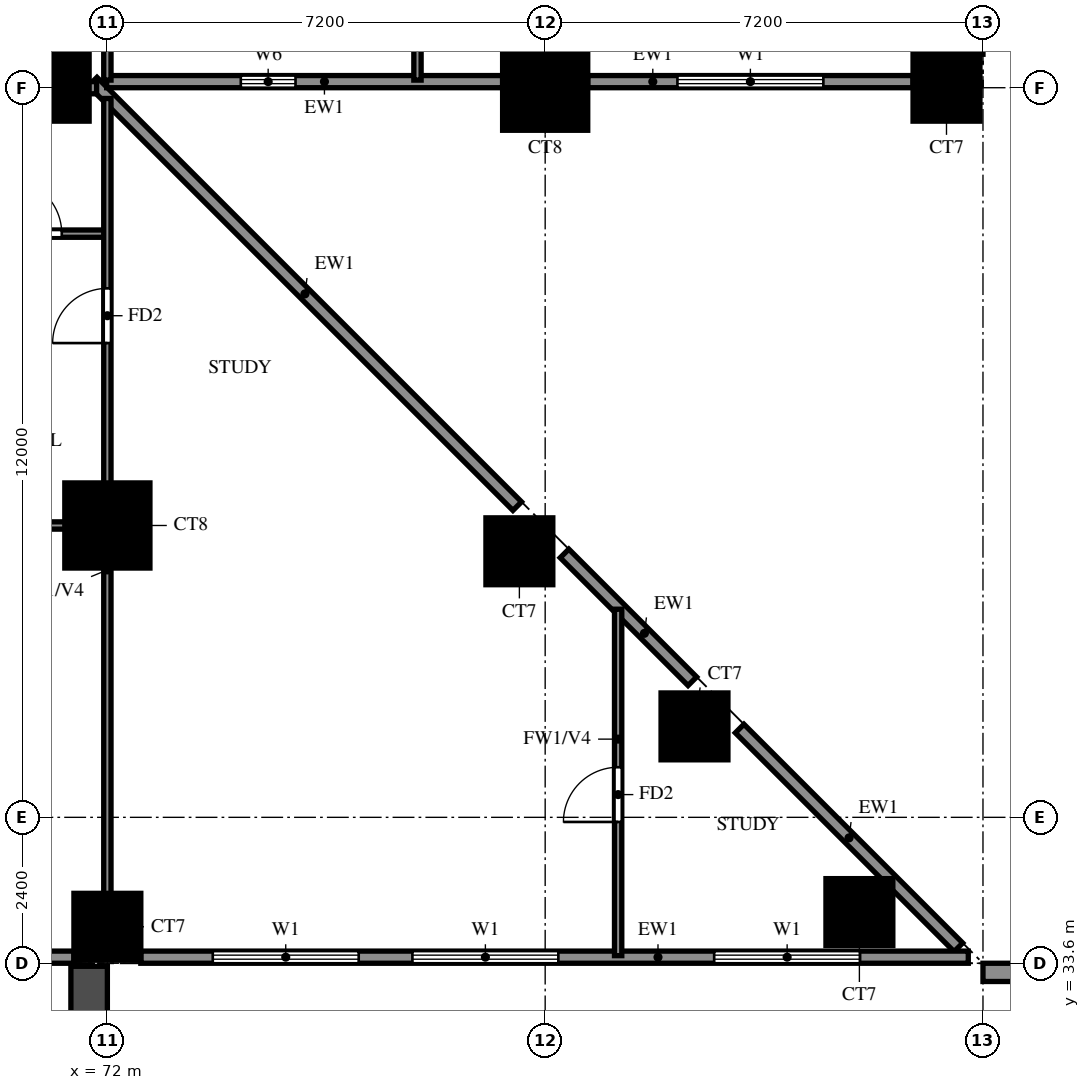
"""IFC4 building model, lengths in metres.
Left out: names, types, materials, properties, quantities, classifications, styles, units other than length and angle.
Written with IfcOpenShell. Run it as: python <this file> out.ifc"""

import sys

from ifc_helpers import new_model, si_unit, direction, frame, frame_2d, origin, origin_2d, place, context, subcontext, project, spatial, rectangle, extrude, source, transform, mapped, element, fill, save


model = new_model("IFC4")
c1 = context("Model", 3, precision=1e-05, world=origin(), true_north=direction((0.0, 1.0)))
c2 = subcontext(c1, "Body", "Model", "MODEL_VIEW")
j1 = project(units=[si_unit("LENGTHUNIT", "METRE"), si_unit("PLANEANGLEUNIT", "RADIAN")], contexts=[c1])
p1 = place(None, origin())
s1 = spatial("IfcSite", under=j1, at=p1, CompositionType="ELEMENT")
p2 = place(p1, origin())
s2 = spatial("IfcBuilding", under=s1, at=p2, CompositionType="ELEMENT")
p3 = place(p2, frame((0.0, 0.0, 44.5)))
s3 = spatial("IfcBuildingStorey", under=s2, at=p3, CompositionType="ELEMENT", Elevation=44.5)
m1 = source(origin(), c2, "Body", "SweptSolid", [
    extrude(rectangle(XDim=1.1, YDim=1.1, at=origin_2d()), origin(), (0.0, 0.0, 1.0), 3.18),
])
for number, where, z_axis, x_axis in (
    (1, (72.0, 34.2, 0.0), (0.0, 0.0, 1.0), (1.0, 0.0, 0.0)),
    (2, (84.367, 34.442, 0.0), (0.0, 0.0, 1.0), (1.0, 0.0, 0.0)),
    (3, (81.656, 37.496, 0.0), (0.0, 0.0, 1.0), (1.0, 0.0, 0.0)),
    (4, (78.776, 40.376, 0.0), (0.0, 0.0, 1.0), (1.0, 0.0, 0.0)),
):
    element("IfcColumn", number, at=place(p3, frame(where, z_axis=z_axis, x_axis=x_axis)), inside=s3, PredefinedType="COLUMN", context=c2, shape_type="MappedRepresentation", body=[
        mapped(m1, transform((0.0, 0.0, 0.0))),
    ])
m2 = source(origin(), c2, "Body", "SweptSolid", [
    extrude(rectangle(XDim=1.4, YDim=1.4, at=origin_2d()), origin(), (0.0, 0.0, 1.0), 3.18),
])
p4 = place(p3, frame((72.0, 40.8, 0.0), z_axis=(0.0, 0.0, 1.0), x_axis=(1.0, 0.0, 0.0)))
e5 = element("IfcColumn", 5, at=p4, inside=s3, PredefinedType="COLUMN", context=c2, shape_type="MappedRepresentation", body=[
    mapped(m2, transform((0.0, 0.0, 0.0))),
])
p5 = place(p3, frame((71.15, 48.0, 0.0), z_axis=(0.0, 0.0, 1.0), x_axis=(1.0, 0.0, 0.0)))
e6 = element("IfcColumn", 6, at=p5, inside=s3, PredefinedType="COLUMN", context=c2, shape_type="MappedRepresentation", body=[
    mapped(m1, transform((0.0, 0.0, 0.0))),
])
p6 = place(p3, frame((79.2, 48.0, 0.0), z_axis=(0.0, 0.0, 1.0), x_axis=(1.0, 0.0, 0.0)))
e7 = element("IfcColumn", 7, at=p6, inside=s3, PredefinedType="COLUMN", context=c2, shape_type="MappedRepresentation", body=[
    mapped(m2, transform((0.0, 0.0, 0.0))),
])
p7 = place(p3, frame((85.8, 48.0, 0.0), z_axis=(0.0, 0.0, 1.0), x_axis=(1.0, 0.0, 0.0)))
e8 = element("IfcColumn", 8, at=p7, inside=s3, PredefinedType="COLUMN", context=c2, shape_type="MappedRepresentation", body=[
    mapped(m1, transform((0.0, 0.0, 0.0))),
])
p8 = place(p3, frame((85.996, 33.863, 0.0), z_axis=(0.0, 0.0, 1.0), x_axis=(-0.7070827891, 0.707130772459, 0.0)))
e9 = element("IfcWall", 9, at=p8, inside=s3, PredefinedType="SOLIDWALL", context=c2, shape_type="SweptSolid", body=[
    extrude(rectangle(XDim=5.088, YDim=0.2, at=frame_2d((2.544, 0.0))), origin(), (0.0, 0.0, 1.0), 3.18),
])
p9 = place(p3, frame((81.62, 38.238, 0.0), z_axis=(0.0, 0.0, 1.0), x_axis=(-0.707106781187, 0.707106781187, 0.0)))
e10 = element("IfcWall", 10, at=p9, inside=s3, PredefinedType="SOLIDWALL", context=c2, shape_type="SweptSolid", body=[
    extrude(rectangle(XDim=2.973, YDim=0.2, at=frame_2d((1.486, 0.0))), origin(), (0.0, 0.0, 1.0), 3.18),
])
p10 = place(p3, frame((78.74, 41.118, 0.0), z_axis=(0.0, 0.0, 1.0), x_axis=(-0.707106781187, 0.707106781187, 0.0)))
e11 = element("IfcWall", 11, at=p10, inside=s3, PredefinedType="SOLIDWALL", context=c2, shape_type="SweptSolid", body=[
    extrude(rectangle(XDim=9.874, YDim=0.2, at=frame_2d((4.937, 0.0))), origin(), (0.0, 0.0, 1.0), 3.18),
])
p11 = place(p3, frame((71.989, 48.1, 0.0), z_axis=(0.0, 0.0, 1.0), x_axis=(1.0, 0.0, 0.0)))
e12 = element("IfcWall", 12, at=p11, inside=s3, PredefinedType="SOLIDWALL", context=c2, shape_type="SweptSolid", body=[
    extrude(rectangle(XDim=6.511, YDim=0.2, at=frame_2d((3.256, 0.0))), origin(), (0.0, 0.0, 1.0), 3.18),
])
p12 = place(p11, frame((2.206, 0.0, 1.5)))
e13 = element("IfcOpeningElement", 13, at=p12, cuts=e12, PredefinedType="OPENING", context=c2, shape_type="SweptSolid", body=[
    extrude(rectangle(XDim=0.9, YDim=0.9, at=frame_2d((0.45, 0.45))), frame((0.0, 0.11, 0.0), z_axis=(0.0, -1.0, 0.0), x_axis=(1.0, 0.0, 0.0)), (0.0, 0.0, 1.0), 0.22),
])
p13 = place(p3, frame((79.9, 48.1, 0.0), z_axis=(0.0, 0.0, 1.0), x_axis=(1.0, 0.0, 0.0)))
e14 = element("IfcWall", 14, at=p13, inside=s3, PredefinedType="SOLIDWALL", context=c2, shape_type="SweptSolid", body=[
    extrude(rectangle(XDim=5.35, YDim=0.2, at=frame_2d((2.675, 0.0))), origin(), (0.0, 0.0, 1.0), 3.18),
])
p14 = place(p13, frame((1.475, 0.0, 0.6)))
e15 = element("IfcOpeningElement", 15, at=p14, cuts=e14, PredefinedType="OPENING", context=c2, shape_type="SweptSolid", body=[
    extrude(rectangle(XDim=2.4, YDim=2.4, at=frame_2d((1.2, 1.2))), frame((0.0, 0.11, 0.0), z_axis=(0.0, -1.0, 0.0), x_axis=(1.0, 0.0, 0.0)), (0.0, 0.0, 1.0), 0.22),
])
p15 = place(p3, frame((86.3, 48.55, 0.0), z_axis=(0.0, 0.0, 1.0), x_axis=(0.0, 1.0, 0.0)))
e16 = element("IfcWall", 16, at=p15, inside=s3, PredefinedType="SOLIDWALL", context=c2, shape_type="SweptSolid", body=[
    extrude(rectangle(XDim=6.1, YDim=0.2, at=frame_2d((3.05, 0.0))), origin(), (0.0, 0.0, 1.0), 3.18),
])
p16 = place(p15, frame((3.95, 0.0, 0.0)))
e17 = element("IfcOpeningElement", 17, at=p16, cuts=e16, PredefinedType="OPENING", context=c2, shape_type="SweptSolid", body=[
    extrude(rectangle(XDim=1.8, YDim=2.4, at=frame_2d((0.9, 1.2))), frame((0.0, 0.11, 0.0), z_axis=(0.0, -1.0, 0.0), x_axis=(1.0, 0.0, 0.0)), (0.0, 0.0, 1.0), 0.22),
])
p17 = place(p15, frame((0.425, 0.0, 0.6)))
e18 = element("IfcOpeningElement", 18, at=p17, cuts=e16, PredefinedType="OPENING", context=c2, shape_type="SweptSolid", body=[
    extrude(rectangle(XDim=1.2, YDim=2.4, at=frame_2d((0.6, 1.2))), frame((0.0, 0.11, 0.0), z_axis=(0.0, -1.0, 0.0), x_axis=(1.0, 0.0, 0.0)), (0.0, 0.0, 1.0), 0.22),
])
p18 = place(p3, frame((65.35, 33.7, 0.0), z_axis=(0.0, 0.0, 1.0), x_axis=(1.0, 0.0, 0.0)))
e19 = element("IfcWall", 19, at=p18, inside=s3, PredefinedType="SOLIDWALL", context=c2, shape_type="SweptSolid", body=[
    extrude(rectangle(XDim=6.1, YDim=0.2, at=frame_2d((3.05, 0.0))), origin(), (0.0, 0.0, 1.0), 3.18),
])
p19 = place(p18, frame((2.15, 0.0, 0.0)))
e20 = element("IfcOpeningElement", 20, at=p19, cuts=e19, PredefinedType="OPENING", context=c2, shape_type="SweptSolid", body=[
    extrude(rectangle(XDim=1.8, YDim=2.4, at=frame_2d((0.9, 1.2))), frame((0.0, 0.11, 0.0), z_axis=(0.0, -1.0, 0.0), x_axis=(1.0, 0.0, 0.0)), (0.0, 0.0, 1.0), 0.22),
])
p20 = place(p18, frame((0.425, 0.0, 0.6)))
e21 = element("IfcOpeningElement", 21, at=p20, cuts=e19, PredefinedType="OPENING", context=c2, shape_type="SweptSolid", body=[
    extrude(rectangle(XDim=1.2, YDim=2.4, at=frame_2d((0.6, 1.2))), frame((0.0, 0.11, 0.0), z_axis=(0.0, -1.0, 0.0), x_axis=(1.0, 0.0, 0.0)), (0.0, 0.0, 1.0), 0.22),
])
p21 = place(p18, frame((4.475, 0.0, 0.6)))
e22 = element("IfcOpeningElement", 22, at=p21, cuts=e19, PredefinedType="OPENING", context=c2, shape_type="SweptSolid", body=[
    extrude(rectangle(XDim=1.2, YDim=2.4, at=frame_2d((0.6, 1.2))), frame((0.0, 0.11, 0.0), z_axis=(0.0, -1.0, 0.0), x_axis=(1.0, 0.0, 0.0)), (0.0, 0.0, 1.0), 0.22),
])
p22 = place(p3, frame((72.55, 33.7, 0.0), z_axis=(0.0, 0.0, 1.0), x_axis=(1.0, 0.0, 0.0)))
e23 = element("IfcWall", 23, at=p22, inside=s3, PredefinedType="SOLIDWALL", context=c2, shape_type="SweptSolid", body=[
    extrude(rectangle(XDim=13.609, YDim=0.2, at=frame_2d((6.804, 0.0))), origin(), (0.0, 0.0, 1.0), 3.18),
])
p23 = place(p22, frame((1.183, 0.0, 0.6)))
e24 = element("IfcOpeningElement", 24, at=p23, cuts=e23, PredefinedType="OPENING", context=c2, shape_type="SweptSolid", body=[
    extrude(rectangle(XDim=2.4, YDim=2.4, at=frame_2d((1.2, 1.2))), frame((0.0, 0.11, 0.0), z_axis=(0.0, -1.0, 0.0), x_axis=(1.0, 0.0, 0.0)), (0.0, 0.0, 1.0), 0.22),
])
p24 = place(p22, frame((4.467, 0.0, 0.6)))
e25 = element("IfcOpeningElement", 25, at=p24, cuts=e23, PredefinedType="OPENING", context=c2, shape_type="SweptSolid", body=[
    extrude(rectangle(XDim=2.4, YDim=2.4, at=frame_2d((1.2, 1.2))), frame((0.0, 0.11, 0.0), z_axis=(0.0, -1.0, 0.0), x_axis=(1.0, 0.0, 0.0)), (0.0, 0.0, 1.0), 0.22),
])
p25 = place(p22, frame((9.429, 0.0, 0.6)))
e26 = element("IfcOpeningElement", 26, at=p25, cuts=e23, PredefinedType="OPENING", context=c2, shape_type="SweptSolid", body=[
    extrude(rectangle(XDim=2.4, YDim=2.4, at=frame_2d((1.2, 1.2))), frame((0.0, 0.11, 0.0), z_axis=(0.0, -1.0, 0.0), x_axis=(1.0, 0.0, 0.0)), (0.0, 0.0, 1.0), 0.22),
])
p26 = place(p3, frame((86.4, 33.45, -0.32), z_axis=(0.0, 0.0, 1.0), x_axis=(1.0, 0.0, 0.0)))
e27 = element("IfcWall", 27, at=p26, inside=s3, PredefinedType="SOLIDWALL", context=c2, shape_type="SweptSolid", body=[
    extrude(rectangle(XDim=2.4, YDim=0.3, at=frame_2d((1.2, 0.0))), origin(), (0.0, 0.0, 1.0), 3.5),
])
p27 = place(p3, frame((71.7, 33.55, 0.0), z_axis=(0.0, 0.0, 1.0), x_axis=(0.0, -1.0, 0.0)))
e28 = element("IfcWall", 28, at=p27, inside=s3, PredefinedType="SOLIDWALL", context=c2, shape_type="SweptSolid", body=[
    extrude(rectangle(XDim=2.65, YDim=0.6, at=frame_2d((1.325, 0.0))), origin(), (0.0, 0.0, 1.0), 2.85),
])
p28 = place(p3, frame((67.2, 48.0, 0.0), z_axis=(0.0, 0.0, 1.0), x_axis=(1.0, 0.0, 0.0)))
e29 = element("IfcWall", 29, at=p28, inside=s3, PredefinedType="SOLIDWALL", context=c2, shape_type="SweptSolid", body=[
    extrude(rectangle(XDim=4.623, YDim=0.2, at=frame_2d((2.312, 0.0))), origin(), (0.0, 0.0, 1.0), 3.18),
])
p29 = place(p3, frame((60.0, 40.8, 0.0), z_axis=(0.0, 0.0, 1.0), x_axis=(1.0, 0.0, 0.0)))
e30 = element("IfcWall", 30, at=p29, inside=s3, PredefinedType="PARTITIONING", context=c2, shape_type="SweptSolid", body=[
    extrude(rectangle(XDim=12.0, YDim=0.12, at=frame_2d((6.0, 0.0))), origin(), (0.0, 0.0, 1.0), 3.18),
])
p30 = place(p29, frame((7.65, 0.0, 0.0)))
e31 = element("IfcOpeningElement", 31, at=p30, cuts=e30, PredefinedType="OPENING", context=c2, shape_type="SweptSolid", body=[
    extrude(rectangle(XDim=1.5, YDim=2.1, at=frame_2d((0.75, 1.05))), frame((0.0, 0.07, 0.0), z_axis=(0.0, -1.0, 0.0), x_axis=(1.0, 0.0, 0.0)), (0.0, 0.0, 1.0), 0.14),
])
p31 = place(p29, frame((1.95, 0.0, 0.0)))
e32 = element("IfcOpeningElement", 32, at=p31, cuts=e30, PredefinedType="OPENING", context=c2, shape_type="SweptSolid", body=[
    extrude(rectangle(XDim=0.9, YDim=2.1, at=frame_2d((0.45, 1.05))), frame((0.0, 0.07, 0.0), z_axis=(0.0, -1.0, 0.0), x_axis=(1.0, 0.0, 0.0)), (0.0, 0.0, 1.0), 0.14),
])
p32 = place(p3, frame((67.2, 45.6, 0.0), z_axis=(0.0, 0.0, 1.0), x_axis=(1.0, 0.0, 0.0)))
e33 = element("IfcWall", 33, at=p32, inside=s3, PredefinedType="PARTITIONING", context=c2, shape_type="SweptSolid", body=[
    extrude(rectangle(XDim=4.8, YDim=0.12, at=frame_2d((2.4, 0.0))), origin(), (0.0, 0.0, 1.0), 3.18),
])
p33 = place(p32, frame((3.15, 0.0, 0.0)))
e34 = element("IfcOpeningElement", 34, at=p33, cuts=e33, PredefinedType="OPENING", context=c2, shape_type="SweptSolid", body=[
    extrude(rectangle(XDim=0.9, YDim=2.1, at=frame_2d((0.45, 1.05))), frame((0.0, 0.07, 0.0), z_axis=(0.0, -1.0, 0.0), x_axis=(1.0, 0.0, 0.0)), (0.0, 0.0, 1.0), 0.14),
])
p34 = place(p3, frame((72.0, 33.725, 0.0), z_axis=(0.0, 0.0, 1.0), x_axis=(0.0, 1.0, 0.0)))
e35 = element("IfcWall", 35, at=p34, inside=s3, PredefinedType="PARTITIONING", context=c2, shape_type="SweptSolid", body=[
    extrude(rectangle(XDim=14.098, YDim=0.12, at=frame_2d((7.049, 0.0))), origin(), (0.0, 0.0, 1.0), 2.28),
])
p35 = place(p34, frame((10.075, 0.0, 0.0)))
e36 = element("IfcOpeningElement", 36, at=p35, cuts=e35, PredefinedType="OPENING", context=c2, shape_type="SweptSolid", body=[
    extrude(rectangle(XDim=0.9, YDim=2.1, at=frame_2d((0.45, 1.05))), frame((0.0, 0.07, 0.0), z_axis=(0.0, -1.0, 0.0), x_axis=(1.0, 0.0, 0.0)), (0.0, 0.0, 1.0), 0.14),
])
p36 = place(p3, frame((72.0, 48.125, 0.0), z_axis=(0.0, 0.0, 1.0), x_axis=(0.0, 1.0, 0.0)))
e37 = element("IfcWall", 37, at=p36, inside=s3, PredefinedType="PARTITIONING", context=c2, shape_type="SweptSolid", body=[
    extrude(rectangle(XDim=7.075, YDim=0.12, at=frame_2d((3.538, 0.0))), origin(), (0.0, 0.0, 1.0), 3.18),
])
p37 = place(p3, frame((77.1, 48.125, 0.0), z_axis=(0.0, 0.0, 1.0), x_axis=(0.0, 1.0, 0.0)))
e38 = element("IfcWall", 38, at=p37, inside=s3, PredefinedType="PARTITIONING", context=c2, shape_type="SweptSolid", body=[
    extrude(rectangle(XDim=7.075, YDim=0.12, at=frame_2d((3.538, 0.0))), origin(), (0.0, 0.0, 1.0), 3.18),
])
p38 = place(p37, frame((1.363, 0.0, 0.0)))
e39 = element("IfcOpeningElement", 39, at=p38, cuts=e38, PredefinedType="OPENING", context=c2, shape_type="SweptSolid", body=[
    extrude(rectangle(XDim=0.8, YDim=2.1, at=frame_2d((0.4, 1.05))), frame((0.0, 0.07, 0.0), z_axis=(0.0, -1.0, 0.0), x_axis=(1.0, 0.0, 0.0)), (0.0, 0.0, 1.0), 0.14),
])
p39 = place(p3, frame((79.2, 48.125, 0.0), z_axis=(0.0, 0.0, 1.0), x_axis=(0.0, 1.0, 0.0)))
e40 = element("IfcWall", 40, at=p39, inside=s3, PredefinedType="PARTITIONING", context=c2, shape_type="SweptSolid", body=[
    extrude(rectangle(XDim=17.875, YDim=0.12, at=frame_2d((8.938, 0.0))), origin(), (0.0, 0.0, 1.0), 3.18),
])
p40 = place(p39, frame((1.288, 0.0, 0.0)))
e41 = element("IfcOpeningElement", 41, at=p40, cuts=e40, PredefinedType="OPENING", context=c2, shape_type="SweptSolid", body=[
    extrude(rectangle(XDim=0.9, YDim=2.1, at=frame_2d((0.45, 1.05))), frame((0.0, 0.07, 0.0), z_axis=(0.0, -1.0, 0.0), x_axis=(1.0, 0.0, 0.0)), (0.0, 0.0, 1.0), 0.14),
])
p41 = place(p39, frame((7.825, 0.0, 0.0)))
e42 = element("IfcOpeningElement", 42, at=p41, cuts=e40, PredefinedType="OPENING", context=c2, shape_type="SweptSolid", body=[
    extrude(rectangle(XDim=1.5, YDim=2.1, at=frame_2d((0.75, 1.05))), frame((0.0, 0.07, 0.0), z_axis=(0.0, -1.0, 0.0), x_axis=(1.0, 0.0, 0.0)), (0.0, 0.0, 1.0), 0.14),
])
p42 = place(p39, frame((12.025, 0.0, 0.0)))
e43 = element("IfcOpeningElement", 43, at=p42, cuts=e40, PredefinedType="OPENING", context=c2, shape_type="SweptSolid", body=[
    extrude(rectangle(XDim=0.9, YDim=2.1, at=frame_2d((0.45, 1.05))), frame((0.0, 0.07, 0.0), z_axis=(0.0, -1.0, 0.0), x_axis=(1.0, 0.0, 0.0)), (0.0, 0.0, 1.0), 0.14),
])
p43 = place(p39, frame((15.625, 0.0, 0.0)))
e44 = element("IfcOpeningElement", 44, at=p43, cuts=e40, PredefinedType="OPENING", context=c2, shape_type="SweptSolid", body=[
    extrude(rectangle(XDim=0.9, YDim=2.1, at=frame_2d((0.45, 1.05))), frame((0.0, 0.07, 0.0), z_axis=(0.0, -1.0, 0.0), x_axis=(1.0, 0.0, 0.0)), (0.0, 0.0, 1.0), 0.14),
])
p44 = place(p3, frame((80.4, 33.725, 0.0), z_axis=(0.0, 0.0, 1.0), x_axis=(0.0, 1.0, 0.0)))
e45 = element("IfcWall", 45, at=p44, inside=s3, PredefinedType="PARTITIONING", context=c2, shape_type="SweptSolid", body=[
    extrude(rectangle(XDim=5.698, YDim=0.12, at=frame_2d((2.849, 0.0))), origin(), (0.0, 0.0, 1.0), 2.28),
])
p45 = place(p44, frame((2.199, 0.0, 0.0)))
e46 = element("IfcOpeningElement", 46, at=p45, cuts=e45, PredefinedType="OPENING", context=c2, shape_type="SweptSolid", body=[
    extrude(rectangle(XDim=0.9, YDim=2.1, at=frame_2d((0.45, 1.05))), frame((0.0, 0.07, 0.0), z_axis=(0.0, -1.0, 0.0), x_axis=(1.0, 0.0, 0.0)), (0.0, 0.0, 1.0), 0.14),
])
p46 = place(p12, origin())
e47 = element("IfcWindow", 47, at=p46, inside=s3, PartitioningType="SINGLE_PANEL", PredefinedType="WINDOW", context=c2, shape_type="SweptSolid", body=[
    extrude(rectangle(XDim=0.9, YDim=0.9, at=frame_2d((0.45, 0.45))), frame((0.0, 0.03, 0.0), z_axis=(0.0, -1.0, 0.0), x_axis=(1.0, 0.0, 0.0)), (0.0, 0.0, 1.0), 0.06),
])
fill(e13, e47)
p47 = place(p14, origin())
e48 = element("IfcWindow", 48, at=p47, inside=s3, PartitioningType="DOUBLE_PANEL_VERTICAL", PredefinedType="WINDOW", context=c2, shape_type="SweptSolid", body=[
    extrude(rectangle(XDim=2.4, YDim=2.4, at=frame_2d((1.2, 1.2))), frame((0.0, 0.03, 0.0), z_axis=(0.0, -1.0, 0.0), x_axis=(1.0, 0.0, 0.0)), (0.0, 0.0, 1.0), 0.06),
])
fill(e15, e48)
p48 = place(p23, origin())
e49 = element("IfcWindow", 49, at=p48, inside=s3, PartitioningType="DOUBLE_PANEL_VERTICAL", PredefinedType="WINDOW", context=c2, shape_type="SweptSolid", body=[
    extrude(rectangle(XDim=2.4, YDim=2.4, at=frame_2d((1.2, 1.2))), frame((0.0, 0.03, 0.0), z_axis=(0.0, -1.0, 0.0), x_axis=(1.0, 0.0, 0.0)), (0.0, 0.0, 1.0), 0.06),
])
fill(e24, e49)
p49 = place(p24, origin())
e50 = element("IfcWindow", 50, at=p49, inside=s3, PartitioningType="DOUBLE_PANEL_VERTICAL", PredefinedType="WINDOW", context=c2, shape_type="SweptSolid", body=[
    extrude(rectangle(XDim=2.4, YDim=2.4, at=frame_2d((1.2, 1.2))), frame((0.0, 0.03, 0.0), z_axis=(0.0, -1.0, 0.0), x_axis=(1.0, 0.0, 0.0)), (0.0, 0.0, 1.0), 0.06),
])
fill(e25, e50)
p50 = place(p25, origin())
e51 = element("IfcWindow", 51, at=p50, inside=s3, PartitioningType="DOUBLE_PANEL_VERTICAL", PredefinedType="WINDOW", context=c2, shape_type="SweptSolid", body=[
    extrude(rectangle(XDim=2.4, YDim=2.4, at=frame_2d((1.2, 1.2))), frame((0.0, 0.03, 0.0), z_axis=(0.0, -1.0, 0.0), x_axis=(1.0, 0.0, 0.0)), (0.0, 0.0, 1.0), 0.06),
])
fill(e26, e51)
p51 = place(p33, origin())
e52 = element("IfcDoor", 52, at=p51, inside=s3, OperationType="SINGLE_SWING_RIGHT", PredefinedType="DOOR", context=c2, shape_type="SweptSolid", body=[
    extrude(rectangle(XDim=0.9, YDim=2.1, at=frame_2d((0.45, 1.05))), frame((0.0, 0.025, 0.0), z_axis=(0.0, -1.0, 0.0), x_axis=(1.0, 0.0, 0.0)), (0.0, 0.0, 1.0), 0.05),
])
fill(e34, e52)
p52 = place(p35, origin())
e53 = element("IfcDoor", 53, at=p52, inside=s3, OperationType="SINGLE_SWING_LEFT", PredefinedType="DOOR", context=c2, shape_type="SweptSolid", body=[
    extrude(rectangle(XDim=0.9, YDim=2.1, at=frame_2d((0.45, 1.05))), frame((0.0, 0.025, 0.0), z_axis=(0.0, -1.0, 0.0), x_axis=(1.0, 0.0, 0.0)), (0.0, 0.0, 1.0), 0.05),
])
fill(e36, e53)
p53 = place(p45, origin())
e54 = element("IfcDoor", 54, at=p53, inside=s3, OperationType="SINGLE_SWING_RIGHT", PredefinedType="DOOR", context=c2, shape_type="SweptSolid", body=[
    extrude(rectangle(XDim=0.9, YDim=2.1, at=frame_2d((0.45, 1.05))), frame((0.0, 0.025, 0.0), z_axis=(0.0, -1.0, 0.0), x_axis=(1.0, 0.0, 0.0)), (0.0, 0.0, 1.0), 0.05),
])
fill(e46, e54)
save(model, sys.argv[1])
